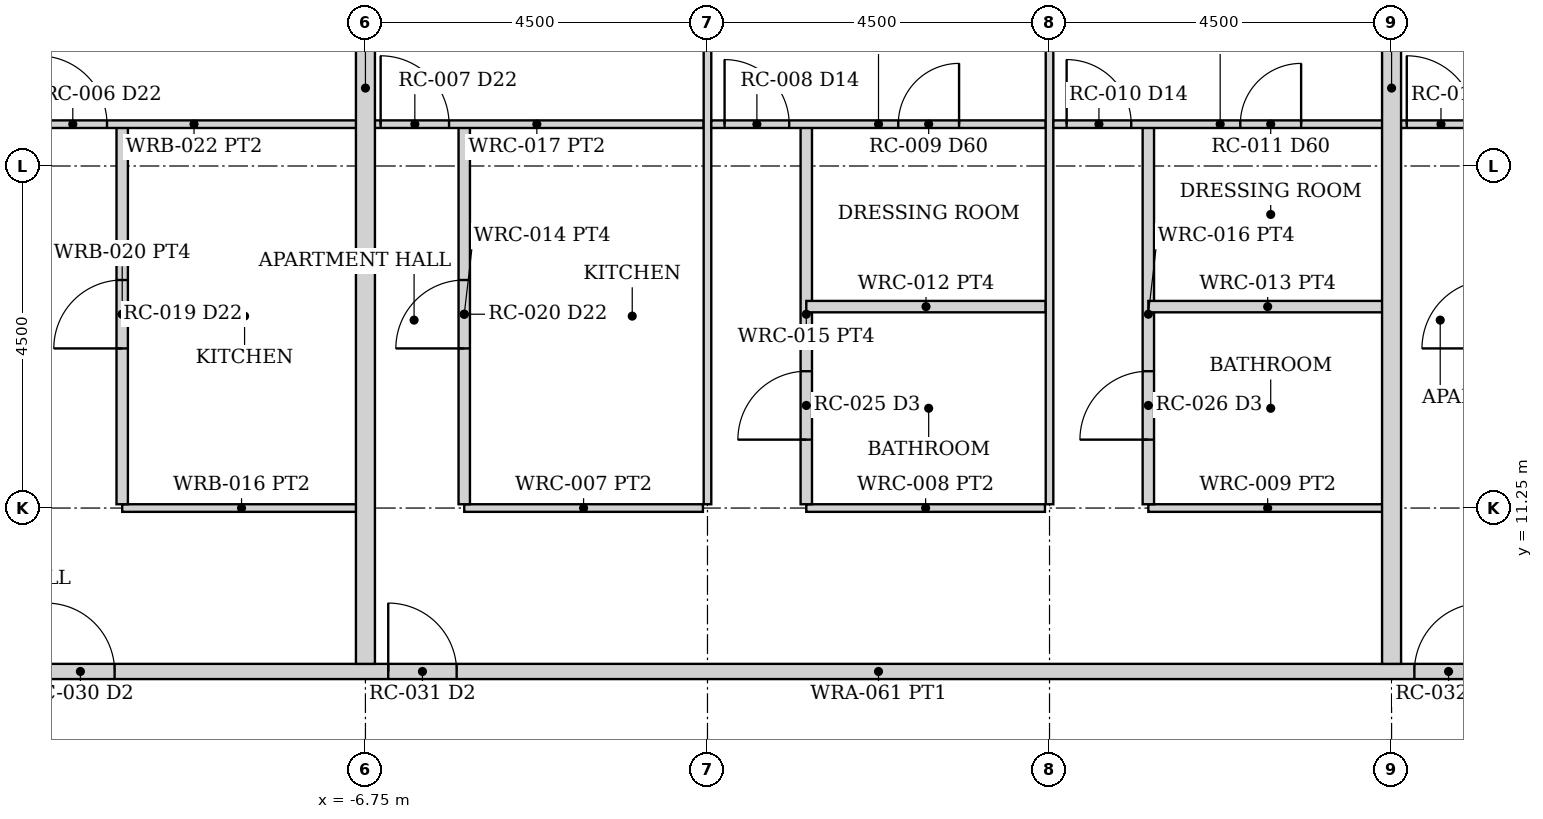
"""IFC4 building model, lengths in metres.
Left out: names, types, materials, properties, quantities, classifications, styles, units other than length and angle.
Written with IfcOpenShell. Run it as: python <this file> out.ifc"""

import sys

from ifc_helpers import new_model, si_unit, direction, frame, frame_2d, origin, place, context, subcontext, project, spatial, rectangle, extrude, element, fill, save


model = new_model("IFC4")
c1 = context("Model", 3, precision=1e-05, world=origin(), true_north=direction((0.0, 1.0)))
c2 = subcontext(c1, "Body", "Model", "MODEL_VIEW")
j1 = project(units=[si_unit("LENGTHUNIT", "METRE"), si_unit("PLANEANGLEUNIT", "RADIAN")], contexts=[c1])
p1 = place(None, origin())
s1 = spatial("IfcSite", under=j1, at=p1, CompositionType="ELEMENT")
p2 = place(p1, origin())
s2 = spatial("IfcBuilding", under=s1, at=p2, CompositionType="ELEMENT")
p3 = place(p2, frame((0.0, 0.0, 47.5)))
s3 = spatial("IfcBuildingStorey", under=s2, at=p3, CompositionType="ELEMENT", Elevation=47.5)
p4 = place(p3, frame((-24.55, 9.1, 0.0), z_axis=(0.0, 0.0, 1.0), x_axis=(1.0, 0.0, 0.0)))
e1 = element("IfcWall", 1, at=p4, inside=s3, PredefinedType="PARTITIONING", context=c2, shape_type="SweptSolid", body=[
    extrude(rectangle(XDim=49.1, YDim=0.2, at=frame_2d((24.55, 0.0))), origin(), (0.0, 0.0, 1.0), 2.373),
])
p5 = place(p4, frame((5.1, 0.0, 0.0)))
e2 = element("IfcOpeningElement", 2, at=p5, cuts=e1, PredefinedType="OPENING", context=c2, shape_type="SweptSolid", body=[
    extrude(rectangle(XDim=0.9, YDim=2.1, at=frame_2d((0.45, 1.05))), frame((0.0, 0.11, 0.0), z_axis=(0.0, -1.0, 0.0), x_axis=(1.0, 0.0, 0.0)), (0.0, 0.0, 1.0), 0.22),
])
p6 = place(p4, frame((13.6, 0.0, 0.0)))
e3 = element("IfcOpeningElement", 3, at=p6, cuts=e1, PredefinedType="OPENING", context=c2, shape_type="SweptSolid", body=[
    extrude(rectangle(XDim=0.9, YDim=2.1, at=frame_2d((0.45, 1.05))), frame((0.0, 0.11, 0.0), z_axis=(0.0, -1.0, 0.0), x_axis=(1.0, 0.0, 0.0)), (0.0, 0.0, 1.0), 0.22),
])
p7 = place(p4, frame((18.1, 0.0, 0.0)))
e4 = element("IfcOpeningElement", 4, at=p7, cuts=e1, PredefinedType="OPENING", context=c2, shape_type="SweptSolid", body=[
    extrude(rectangle(XDim=0.9, YDim=2.1, at=frame_2d((0.45, 1.05))), frame((0.0, 0.11, 0.0), z_axis=(0.0, -1.0, 0.0), x_axis=(1.0, 0.0, 0.0)), (0.0, 0.0, 1.0), 0.22),
])
p8 = place(p4, frame((31.6, 0.0, 0.0)))
e5 = element("IfcOpeningElement", 5, at=p8, cuts=e1, PredefinedType="OPENING", context=c2, shape_type="SweptSolid", body=[
    extrude(rectangle(XDim=0.9, YDim=2.1, at=frame_2d((0.45, 1.05))), frame((0.0, 0.11, 0.0), z_axis=(0.0, -1.0, 0.0), x_axis=(1.0, 0.0, 0.0)), (0.0, 0.0, 1.0), 0.22),
])
p9 = place(p4, frame((43.1, 0.0, 0.0)))
e6 = element("IfcOpeningElement", 6, at=p9, cuts=e1, PredefinedType="OPENING", context=c2, shape_type="SweptSolid", body=[
    extrude(rectangle(XDim=0.9, YDim=2.1, at=frame_2d((0.45, 1.05))), frame((0.0, 0.11, 0.0), z_axis=(0.0, -1.0, 0.0), x_axis=(1.0, 0.0, 0.0)), (0.0, 0.0, 1.0), 0.22),
])
p10 = place(p3, frame((-9.95, 11.25, 0.0), z_axis=(0.0, 0.0, 1.0), x_axis=(1.0, 0.0, 0.0)))
e7 = element("IfcWall", 7, at=p10, inside=s3, PredefinedType="PARTITIONING", context=c2, shape_type="SweptSolid", body=[
    extrude(rectangle(XDim=3.14, YDim=0.1, at=frame_2d((1.57, 0.0))), origin(), (0.0, 0.0, 1.0), 2.373),
])
p11 = place(p3, frame((-9.95, 11.3, 0.0), z_axis=(0.0, 0.0, 1.0), x_axis=(0.0, 1.0, 0.0)))
e8 = element("IfcWall", 8, at=p11, inside=s3, PredefinedType="PARTITIONING", context=c2, shape_type="SweptSolid", body=[
    extrude(rectangle(XDim=5.0, YDim=0.15, at=frame_2d((2.5, 0.0))), origin(), (0.0, 0.0, 1.0), 2.373),
])
p12 = place(p11, frame((2.05, 0.0, 0.0)))
e9 = element("IfcOpeningElement", 9, at=p12, cuts=e8, PredefinedType="OPENING", context=c2, shape_type="SweptSolid", body=[
    extrude(rectangle(XDim=0.9, YDim=2.1, at=frame_2d((0.45, 1.05))), frame((0.0, 0.085, 0.0), z_axis=(0.0, -1.0, 0.0), x_axis=(1.0, 0.0, 0.0)), (0.0, 0.0, 1.0), 0.17),
])
p13 = place(p3, frame((-11.2, 16.3, 0.0), z_axis=(0.0, 0.0, 1.0), x_axis=(1.0, 0.0, 0.0)))
e10 = element("IfcWall", 10, at=p13, inside=s3, PredefinedType="PARTITIONING", context=c2, shape_type="SweptSolid", body=[
    extrude(rectangle(XDim=4.39, YDim=0.1, at=frame_2d((2.195, 0.0))), origin(), (0.0, 0.0, 1.0), 2.373),
])
p14 = place(p13, frame((0.15, 0.0, 0.0)))
e11 = element("IfcOpeningElement", 11, at=p14, cuts=e10, PredefinedType="OPENING", context=c2, shape_type="SweptSolid", body=[
    extrude(rectangle(XDim=0.9, YDim=2.1, at=frame_2d((0.45, 1.05))), frame((0.0, 0.06, 0.0), z_axis=(0.0, -1.0, 0.0), x_axis=(1.0, 0.0, 0.0)), (0.0, 0.0, 1.0), 0.12),
])
p15 = place(p3, frame((-5.45, 11.25, 0.0), z_axis=(0.0, 0.0, 1.0), x_axis=(1.0, 0.0, 0.0)))
e12 = element("IfcWall", 12, at=p15, inside=s3, PredefinedType="PARTITIONING", context=c2, shape_type="SweptSolid", body=[
    extrude(rectangle(XDim=3.14, YDim=0.1, at=frame_2d((1.57, 0.0))), origin(), (0.0, 0.0, 1.0), 2.373),
])
p16 = place(p3, frame((-5.45, 11.3, 0.0), z_axis=(0.0, 0.0, 1.0), x_axis=(0.0, 1.0, 0.0)))
e13 = element("IfcWall", 13, at=p16, inside=s3, PredefinedType="PARTITIONING", context=c2, shape_type="SweptSolid", body=[
    extrude(rectangle(XDim=5.0, YDim=0.15, at=frame_2d((2.5, 0.0))), origin(), (0.0, 0.0, 1.0), 2.373),
])
p17 = place(p16, frame((2.05, 0.0, 0.0)))
e14 = element("IfcOpeningElement", 14, at=p17, cuts=e13, PredefinedType="OPENING", context=c2, shape_type="SweptSolid", body=[
    extrude(rectangle(XDim=0.9, YDim=2.1, at=frame_2d((0.45, 1.05))), frame((0.0, 0.085, 0.0), z_axis=(0.0, -1.0, 0.0), x_axis=(1.0, 0.0, 0.0)), (0.0, 0.0, 1.0), 0.17),
])
p18 = place(p3, frame((-6.69, 16.3, 0.0), z_axis=(0.0, 0.0, 1.0), x_axis=(1.0, 0.0, 0.0)))
e15 = element("IfcWall", 15, at=p18, inside=s3, PredefinedType="PARTITIONING", context=c2, shape_type="SweptSolid", body=[
    extrude(rectangle(XDim=4.39, YDim=0.1, at=frame_2d((2.195, 0.0))), origin(), (0.0, 0.0, 1.0), 2.373),
])
p19 = place(p18, frame((0.14, 0.0, 0.0)))
e16 = element("IfcOpeningElement", 16, at=p19, cuts=e15, PredefinedType="OPENING", context=c2, shape_type="SweptSolid", body=[
    extrude(rectangle(XDim=0.9, YDim=2.1, at=frame_2d((0.45, 1.05))), frame((0.0, 0.06, 0.0), z_axis=(0.0, -1.0, 0.0), x_axis=(1.0, 0.0, 0.0)), (0.0, 0.0, 1.0), 0.12),
])
p20 = place(p3, frame((-2.25, 11.3, 0.0), z_axis=(0.0, 0.0, 1.0), x_axis=(0.0, 1.0, 0.0)))
e17 = element("IfcWall", 17, at=p20, inside=s3, PredefinedType="PARTITIONING", context=c2, shape_type="SweptSolid", body=[
    extrude(rectangle(XDim=13.05, YDim=0.1, at=frame_2d((6.525, 0.0))), origin(), (0.0, 0.0, 1.0), 2.373),
])
p21 = place(p3, frame((-0.95, 11.25, 0.0), z_axis=(0.0, 0.0, 1.0), x_axis=(1.0, 0.0, 0.0)))
e18 = element("IfcWall", 18, at=p21, inside=s3, PredefinedType="PARTITIONING", context=c2, shape_type="SweptSolid", body=[
    extrude(rectangle(XDim=3.14, YDim=0.1, at=frame_2d((1.57, 0.0))), origin(), (0.0, 0.0, 1.0), 2.373),
])
p22 = place(p3, frame((-0.95, 11.3, 0.0), z_axis=(0.0, 0.0, 1.0), x_axis=(0.0, 1.0, 0.0)))
e19 = element("IfcWall", 19, at=p22, inside=s3, PredefinedType="PARTITIONING", context=c2, shape_type="SweptSolid", body=[
    extrude(rectangle(XDim=5.0, YDim=0.15, at=frame_2d((2.5, 0.0))), origin(), (0.0, 0.0, 1.0), 2.373),
])
p23 = place(p22, frame((0.85, 0.0, 0.0)))
e20 = element("IfcOpeningElement", 20, at=p23, cuts=e19, PredefinedType="OPENING", context=c2, shape_type="SweptSolid", body=[
    extrude(rectangle(XDim=0.9, YDim=2.1, at=frame_2d((0.45, 1.05))), frame((0.0, 0.085, 0.0), z_axis=(0.0, -1.0, 0.0), x_axis=(1.0, 0.0, 0.0)), (0.0, 0.0, 1.0), 0.17),
])
p24 = place(p3, frame((-2.2, 16.3, 0.0), z_axis=(0.0, 0.0, 1.0), x_axis=(1.0, 0.0, 0.0)))
e21 = element("IfcWall", 21, at=p24, inside=s3, PredefinedType="PARTITIONING", context=c2, shape_type="SweptSolid", body=[
    extrude(rectangle(XDim=4.4, YDim=0.1, at=frame_2d((2.2, 0.0))), origin(), (0.0, 0.0, 1.0), 2.373),
])
p25 = place(p24, frame((0.175, 0.0, 0.0)))
e22 = element("IfcOpeningElement", 22, at=p25, cuts=e21, PredefinedType="OPENING", context=c2, shape_type="SweptSolid", body=[
    extrude(rectangle(XDim=0.85, YDim=2.1, at=frame_2d((0.425, 1.05))), frame((0.0, 0.06, 0.0), z_axis=(0.0, -1.0, 0.0), x_axis=(1.0, 0.0, 0.0)), (0.0, 0.0, 1.0), 0.12),
])
p26 = place(p24, frame((2.46, 0.0, 0.0)))
e23 = element("IfcOpeningElement", 23, at=p26, cuts=e21, PredefinedType="OPENING", context=c2, shape_type="SweptSolid", body=[
    extrude(rectangle(XDim=0.8, YDim=2.1, at=frame_2d((0.4, 1.05))), frame((0.0, 0.06, 0.0), z_axis=(0.0, -1.0, 0.0), x_axis=(1.0, 0.0, 0.0)), (0.0, 0.0, 1.0), 0.12),
])
p27 = place(p3, frame((-0.95, 13.9, 0.0), z_axis=(0.0, 0.0, 1.0), x_axis=(1.0, 0.0, 0.0)))
e24 = element("IfcWall", 24, at=p27, inside=s3, PredefinedType="PARTITIONING", context=c2, shape_type="SweptSolid", body=[
    extrude(rectangle(XDim=3.15, YDim=0.15, at=frame_2d((1.575, 0.0))), origin(), (0.0, 0.0, 1.0), 2.373),
])
p28 = place(p3, frame((2.25, 11.3, 0.0), z_axis=(0.0, 0.0, 1.0), x_axis=(0.0, 1.0, 0.0)))
e25 = element("IfcWall", 25, at=p28, inside=s3, PredefinedType="PARTITIONING", context=c2, shape_type="SweptSolid", body=[
    extrude(rectangle(XDim=13.05, YDim=0.1, at=frame_2d((6.525, 0.0))), origin(), (0.0, 0.0, 1.0), 2.373),
])
p29 = place(p3, frame((3.55, 11.25, 0.0), z_axis=(0.0, 0.0, 1.0), x_axis=(1.0, 0.0, 0.0)))
e26 = element("IfcWall", 26, at=p29, inside=s3, PredefinedType="PARTITIONING", context=c2, shape_type="SweptSolid", body=[
    extrude(rectangle(XDim=3.14, YDim=0.1, at=frame_2d((1.57, 0.0))), origin(), (0.0, 0.0, 1.0), 2.373),
])
p30 = place(p3, frame((3.55, 11.3, 0.0), z_axis=(0.0, 0.0, 1.0), x_axis=(0.0, 1.0, 0.0)))
e27 = element("IfcWall", 27, at=p30, inside=s3, PredefinedType="PARTITIONING", context=c2, shape_type="SweptSolid", body=[
    extrude(rectangle(XDim=5.0, YDim=0.15, at=frame_2d((2.5, 0.0))), origin(), (0.0, 0.0, 1.0), 2.373),
])
p31 = place(p30, frame((0.85, 0.0, 0.0)))
e28 = element("IfcOpeningElement", 28, at=p31, cuts=e27, PredefinedType="OPENING", context=c2, shape_type="SweptSolid", body=[
    extrude(rectangle(XDim=0.9, YDim=2.1, at=frame_2d((0.45, 1.05))), frame((0.0, 0.085, 0.0), z_axis=(0.0, -1.0, 0.0), x_axis=(1.0, 0.0, 0.0)), (0.0, 0.0, 1.0), 0.17),
])
p32 = place(p3, frame((2.3, 16.3, 0.0), z_axis=(0.0, 0.0, 1.0), x_axis=(1.0, 0.0, 0.0)))
e29 = element("IfcWall", 29, at=p32, inside=s3, PredefinedType="PARTITIONING", context=c2, shape_type="SweptSolid", body=[
    extrude(rectangle(XDim=4.39, YDim=0.1, at=frame_2d((2.195, 0.0))), origin(), (0.0, 0.0, 1.0), 2.373),
])
p33 = place(p32, frame((0.175, 0.0, 0.0)))
e30 = element("IfcOpeningElement", 30, at=p33, cuts=e29, PredefinedType="OPENING", context=c2, shape_type="SweptSolid", body=[
    extrude(rectangle(XDim=0.85, YDim=2.1, at=frame_2d((0.425, 1.05))), frame((0.0, 0.06, 0.0), z_axis=(0.0, -1.0, 0.0), x_axis=(1.0, 0.0, 0.0)), (0.0, 0.0, 1.0), 0.12),
])
p34 = place(p32, frame((2.46, 0.0, 0.0)))
e31 = element("IfcOpeningElement", 31, at=p34, cuts=e29, PredefinedType="OPENING", context=c2, shape_type="SweptSolid", body=[
    extrude(rectangle(XDim=0.8, YDim=2.1, at=frame_2d((0.4, 1.05))), frame((0.0, 0.06, 0.0), z_axis=(0.0, -1.0, 0.0), x_axis=(1.0, 0.0, 0.0)), (0.0, 0.0, 1.0), 0.12),
])
p35 = place(p3, frame((3.55, 13.9, 0.0), z_axis=(0.0, 0.0, 1.0), x_axis=(1.0, 0.0, 0.0)))
e32 = element("IfcWall", 32, at=p35, inside=s3, PredefinedType="PARTITIONING", context=c2, shape_type="SweptSolid", body=[
    extrude(rectangle(XDim=3.14, YDim=0.15, at=frame_2d((1.57, 0.0))), origin(), (0.0, 0.0, 1.0), 2.373),
])
p36 = place(p3, frame((6.81, 16.3, 0.0), z_axis=(0.0, 0.0, 1.0), x_axis=(1.0, 0.0, 0.0)))
e33 = element("IfcWall", 33, at=p36, inside=s3, PredefinedType="PARTITIONING", context=c2, shape_type="SweptSolid", body=[
    extrude(rectangle(XDim=4.39, YDim=0.1, at=frame_2d((2.195, 0.0))), origin(), (0.0, 0.0, 1.0), 2.373),
])
p37 = place(p36, frame((0.14, 0.0, 0.0)))
e34 = element("IfcOpeningElement", 34, at=p37, cuts=e33, PredefinedType="OPENING", context=c2, shape_type="SweptSolid", body=[
    extrude(rectangle(XDim=0.9, YDim=2.1, at=frame_2d((0.45, 1.05))), frame((0.0, 0.06, 0.0), z_axis=(0.0, -1.0, 0.0), x_axis=(1.0, 0.0, 0.0)), (0.0, 0.0, 1.0), 0.12),
])
for number, where, z_axis, x_axis in (
    (35, (-6.75, 9.2, 0.0), (0.0, 0.0, 1.0), (0.0, 1.0, 0.0)),
    (36, (6.75, 9.2, 0.0), (0.0, 0.0, 1.0), (0.0, 1.0, 0.0)),
):
    element("IfcWall", number, at=place(p3, frame(where, z_axis=z_axis, x_axis=x_axis)), inside=s3, PredefinedType="PARTITIONING", context=c2, shape_type="SweptSolid", body=[
        extrude(rectangle(XDim=15.15, YDim=0.25, at=frame_2d((7.575, 0.0))), origin(), (0.0, 0.0, 1.0), 2.373),
    ])
p38 = place(p6, origin())
e37 = element("IfcDoor", 37, at=p38, inside=s3, OperationType="SINGLE_SWING_LEFT", PredefinedType="DOOR", context=c2, shape_type="SweptSolid", body=[
    extrude(rectangle(XDim=0.9, YDim=2.1, at=frame_2d((0.45, 1.05))), frame((0.0, 0.025, 0.0), z_axis=(0.0, -1.0, 0.0), x_axis=(1.0, 0.0, 0.0)), (0.0, 0.0, 1.0), 0.05),
])
fill(e3, e37)
p39 = place(p12, origin())
e38 = element("IfcDoor", 38, at=p39, inside=s3, OperationType="SINGLE_SWING_LEFT", PredefinedType="DOOR", context=c2, shape_type="SweptSolid", body=[
    extrude(rectangle(XDim=0.9, YDim=2.1, at=frame_2d((0.45, 1.05))), frame((0.0, 0.025, 0.0), z_axis=(0.0, -1.0, 0.0), x_axis=(1.0, 0.0, 0.0)), (0.0, 0.0, 1.0), 0.05),
])
fill(e9, e38)
p40 = place(p14, origin())
e39 = element("IfcDoor", 39, at=p40, inside=s3, OperationType="SINGLE_SWING_LEFT", PredefinedType="DOOR", context=c2, shape_type="SweptSolid", body=[
    extrude(rectangle(XDim=0.9, YDim=2.1, at=frame_2d((0.45, 1.05))), frame((0.0, 0.025, 0.0), z_axis=(0.0, -1.0, 0.0), x_axis=(1.0, 0.0, 0.0)), (0.0, 0.0, 1.0), 0.05),
])
fill(e11, e39)
p41 = place(p7, origin())
e40 = element("IfcDoor", 40, at=p41, inside=s3, OperationType="SINGLE_SWING_LEFT", PredefinedType="DOOR", context=c2, shape_type="SweptSolid", body=[
    extrude(rectangle(XDim=0.9, YDim=2.1, at=frame_2d((0.45, 1.05))), frame((0.0, 0.025, 0.0), z_axis=(0.0, -1.0, 0.0), x_axis=(1.0, 0.0, 0.0)), (0.0, 0.0, 1.0), 0.05),
])
fill(e4, e40)
p42 = place(p17, origin())
e41 = element("IfcDoor", 41, at=p42, inside=s3, OperationType="SINGLE_SWING_LEFT", PredefinedType="DOOR", context=c2, shape_type="SweptSolid", body=[
    extrude(rectangle(XDim=0.9, YDim=2.1, at=frame_2d((0.45, 1.05))), frame((0.0, 0.025, 0.0), z_axis=(0.0, -1.0, 0.0), x_axis=(1.0, 0.0, 0.0)), (0.0, 0.0, 1.0), 0.05),
])
fill(e14, e41)
p43 = place(p19, origin())
e42 = element("IfcDoor", 42, at=p43, inside=s3, OperationType="SINGLE_SWING_LEFT", PredefinedType="DOOR", context=c2, shape_type="SweptSolid", body=[
    extrude(rectangle(XDim=0.9, YDim=2.1, at=frame_2d((0.45, 1.05))), frame((0.0, 0.025, 0.0), z_axis=(0.0, -1.0, 0.0), x_axis=(1.0, 0.0, 0.0)), (0.0, 0.0, 1.0), 0.05),
])
fill(e16, e42)
p44 = place(p25, origin())
e43 = element("IfcDoor", 43, at=p44, inside=s3, OperationType="SINGLE_SWING_LEFT", PredefinedType="DOOR", context=c2, shape_type="SweptSolid", body=[
    extrude(rectangle(XDim=0.85, YDim=2.1, at=frame_2d((0.425, 1.05))), frame((0.0, 0.025, 0.0), z_axis=(0.0, -1.0, 0.0), x_axis=(1.0, 0.0, 0.0)), (0.0, 0.0, 1.0), 0.05),
])
fill(e22, e43)
p45 = place(p23, origin())
e44 = element("IfcDoor", 44, at=p45, inside=s3, OperationType="SINGLE_SWING_LEFT", PredefinedType="DOOR", context=c2, shape_type="SweptSolid", body=[
    extrude(rectangle(XDim=0.9, YDim=2.1, at=frame_2d((0.45, 1.05))), frame((0.0, 0.025, 0.0), z_axis=(0.0, -1.0, 0.0), x_axis=(1.0, 0.0, 0.0)), (0.0, 0.0, 1.0), 0.05),
])
fill(e20, e44)
p46 = place(p26, origin())
e45 = element("IfcDoor", 45, at=p46, inside=s3, OperationType="SINGLE_SWING_RIGHT", PredefinedType="DOOR", context=c2, shape_type="SweptSolid", body=[
    extrude(rectangle(XDim=0.8, YDim=2.1, at=frame_2d((0.4, 1.05))), frame((0.0, 0.025, 0.0), z_axis=(0.0, -1.0, 0.0), x_axis=(1.0, 0.0, 0.0)), (0.0, 0.0, 1.0), 0.05),
])
fill(e23, e45)
p47 = place(p33, origin())
e46 = element("IfcDoor", 46, at=p47, inside=s3, OperationType="SINGLE_SWING_LEFT", PredefinedType="DOOR", context=c2, shape_type="SweptSolid", body=[
    extrude(rectangle(XDim=0.85, YDim=2.1, at=frame_2d((0.425, 1.05))), frame((0.0, 0.025, 0.0), z_axis=(0.0, -1.0, 0.0), x_axis=(1.0, 0.0, 0.0)), (0.0, 0.0, 1.0), 0.05),
])
fill(e30, e46)
p48 = place(p31, origin())
e47 = element("IfcDoor", 47, at=p48, inside=s3, OperationType="SINGLE_SWING_LEFT", PredefinedType="DOOR", context=c2, shape_type="SweptSolid", body=[
    extrude(rectangle(XDim=0.9, YDim=2.1, at=frame_2d((0.45, 1.05))), frame((0.0, 0.025, 0.0), z_axis=(0.0, -1.0, 0.0), x_axis=(1.0, 0.0, 0.0)), (0.0, 0.0, 1.0), 0.05),
])
fill(e28, e47)
p49 = place(p34, origin())
e48 = element("IfcDoor", 48, at=p49, inside=s3, OperationType="SINGLE_SWING_RIGHT", PredefinedType="DOOR", context=c2, shape_type="SweptSolid", body=[
    extrude(rectangle(XDim=0.8, YDim=2.1, at=frame_2d((0.4, 1.05))), frame((0.0, 0.025, 0.0), z_axis=(0.0, -1.0, 0.0), x_axis=(1.0, 0.0, 0.0)), (0.0, 0.0, 1.0), 0.05),
])
fill(e31, e48)
p50 = place(p8, origin())
e49 = element("IfcDoor", 49, at=p50, inside=s3, OperationType="SINGLE_SWING_RIGHT", PredefinedType="DOOR", context=c2, shape_type="SweptSolid", body=[
    extrude(rectangle(XDim=0.9, YDim=2.1, at=frame_2d((0.45, 1.05))), frame((0.0, 0.025, 0.0), z_axis=(0.0, -1.0, 0.0), x_axis=(1.0, 0.0, 0.0)), (0.0, 0.0, 1.0), 0.05),
])
fill(e5, e49)
p51 = place(p37, origin())
e50 = element("IfcDoor", 50, at=p51, inside=s3, OperationType="SINGLE_SWING_LEFT", PredefinedType="DOOR", context=c2, shape_type="SweptSolid", body=[
    extrude(rectangle(XDim=0.9, YDim=2.1, at=frame_2d((0.45, 1.05))), frame((0.0, 0.025, 0.0), z_axis=(0.0, -1.0, 0.0), x_axis=(1.0, 0.0, 0.0)), (0.0, 0.0, 1.0), 0.05),
])
fill(e34, e50)
save(model, sys.argv[1])
